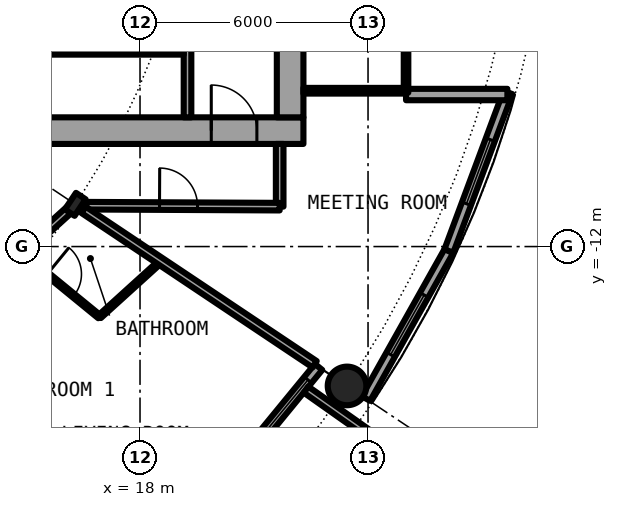
"""IFC4 building model, lengths in metres.
Left out: names, types, materials, properties, quantities, classifications, styles, units other than length and angle.
Written with IfcOpenShell. Run it as: python <this file> out.ifc"""

import sys

from ifc_helpers import new_model, si_unit, direction, frame, frame_2d, origin, origin_2d, place, context, subcontext, project, spatial, rectangle, hollow_circle, i_section, extrude, element, fill, save


model = new_model("IFC4")
c1 = context("Model", 3, precision=1e-05, world=origin(), true_north=direction((0.0, 1.0)))
c2 = subcontext(c1, "Body", "Model", "MODEL_VIEW")
j1 = project(units=[si_unit("LENGTHUNIT", "METRE"), si_unit("PLANEANGLEUNIT", "RADIAN")], contexts=[c1])
p1 = place(None, origin())
s1 = spatial("IfcSite", under=j1, at=p1, CompositionType="ELEMENT")
p2 = place(p1, origin())
s2 = spatial("IfcBuilding", under=s1, at=p2, CompositionType="ELEMENT")
p3 = place(p2, frame((0.0, 0.0, 81.9)))
s3 = spatial("IfcBuildingStorey", under=s2, at=p3, CompositionType="ELEMENT", Elevation=81.9)
p4 = place(p3, frame((23.448, -15.667, 0.0), z_axis=(0.0, 0.0, 1.0), x_axis=(1.0, 0.0, 0.0)))
e1 = element("IfcColumn", 1, at=p4, inside=s3, PredefinedType="COLUMN", context=c2, shape_type="SweptSolid", body=[
    extrude(hollow_circle(Radius=0.508, WallThickness=0.04, at=origin_2d()), origin(), (0.0, 0.0, 1.0), 3.05),
])
p5 = place(p3, frame((16.297, -10.889, 0.0), z_axis=(0.0, 0.0, 1.0), x_axis=(0.831469612303, -0.55557023302, 0.0)))
e2 = element("IfcColumn", 2, at=p5, inside=s3, PredefinedType="COLUMN", context=c2, shape_type="SweptSolid", body=[
    extrude(i_section(OverallWidth=0.306, OverallDepth=0.524, WebThickness=0.021, FlangeThickness=0.04, FilletRadius=0.027, at=origin_2d()), origin(), (0.0, 0.0, 1.0), 3.05),
])
p6 = place(p3, frame((19.304, -19.304, 0.0), z_axis=(0.0, 0.0, 1.0), x_axis=(0.634382322723, 0.773019449054, 0.0)))
e3 = element("IfcWall", 3, at=p6, inside=s3, PredefinedType="SOLIDWALL", context=c2, shape_type="SweptSolid", body=[
    extrude(rectangle(XDim=5.352, YDim=0.25, at=frame_2d((2.676, 0.0))), origin(), (0.0, 0.0, 1.0), 2.7),
])
p7 = place(p6, frame((0.841, 0.0, 0.0)))
e4 = element("IfcOpeningElement", 4, at=p7, cuts=e3, PredefinedType="OPENING", context=c2, shape_type="SweptSolid", body=[
    extrude(rectangle(XDim=1.0, YDim=2.2, at=frame_2d((0.5, 1.1))), frame((0.0, 0.135, 0.0), z_axis=(0.0, -1.0, 0.0), x_axis=(1.0, 0.0, 0.0)), (0.0, 0.0, 1.0), 0.27),
])
p8 = place(p6, frame((3.111, 0.0, 0.3)))
e5 = element("IfcOpeningElement", 5, at=p8, cuts=e3, PredefinedType="OPENING", context=c2, shape_type="SweptSolid", body=[
    extrude(rectangle(XDim=1.8, YDim=2.1, at=frame_2d((0.9, 1.05))), frame((0.0, 0.135, 0.0), z_axis=(0.0, -1.0, 0.0), x_axis=(1.0, 0.0, 0.0)), (0.0, 0.0, 1.0), 0.27),
])
p9 = place(p3, frame((22.37, -15.765, -0.03), z_axis=(0.0, 0.0, 1.0), x_axis=(0.817256123454, -0.576274612209, 0.0)))
e6 = element("IfcWall", 6, at=p9, inside=s3, PredefinedType="SOLIDWALL", context=c2, shape_type="SweptSolid", body=[
    extrude(rectangle(XDim=2.933, YDim=0.2, at=frame_2d((1.466, 0.0))), origin(), (0.0, 0.0, 1.0), 2.73),
])
p10 = place(p3, frame((23.946, -16.0, 0.0), z_axis=(0.0, 0.0, 1.0), x_axis=(0.489696356642, 0.871893042919, 0.0)))
e7 = element("IfcWall", 7, at=p10, inside=s3, PredefinedType="SOLIDWALL", context=c2, shape_type="SweptSolid", body=[
    extrude(rectangle(XDim=4.454, YDim=0.25, at=frame_2d((2.227, 0.0))), origin(), (0.0, 0.0, 1.0), 2.7),
])
p11 = place(p10, frame((1.327, 0.0, 0.3)))
e8 = element("IfcOpeningElement", 8, at=p11, cuts=e7, PredefinedType="OPENING", context=c2, shape_type="SweptSolid", body=[
    extrude(rectangle(XDim=1.8, YDim=2.1, at=frame_2d((0.9, 1.05))), frame((0.0, 0.135, 0.0), z_axis=(0.0, -1.0, 0.0), x_axis=(1.0, 0.0, 0.0)), (0.0, 0.0, 1.0), 0.27),
])
p12 = place(p3, frame((26.127, -12.117, 0.0), z_axis=(0.0, 0.0, 1.0), x_axis=(0.349247811493, 0.937030397675, 0.0)))
e9 = element("IfcWall", 9, at=p12, inside=s3, PredefinedType="SOLIDWALL", context=c2, shape_type="SweptSolid", body=[
    extrude(rectangle(XDim=4.452, YDim=0.25, at=frame_2d((2.226, 0.0))), origin(), (0.0, 0.0, 1.0), 2.7),
])
p13 = place(p12, frame((1.327, 0.0, 0.3)))
e10 = element("IfcOpeningElement", 10, at=p13, cuts=e9, PredefinedType="OPENING", context=c2, shape_type="SweptSolid", body=[
    extrude(rectangle(XDim=1.8, YDim=2.1, at=frame_2d((0.9, 1.05))), frame((0.0, 0.135, 0.0), z_axis=(0.0, -1.0, 0.0), x_axis=(1.0, 0.0, 0.0)), (0.0, 0.0, 1.0), 0.27),
])
p14 = place(p3, frame((25.0, -8.0, 0.0), z_axis=(0.0, 0.0, 1.0), x_axis=(1.0, 0.0, 0.0)))
e11 = element("IfcWall", 11, at=p14, inside=s3, PredefinedType="SOLIDWALL", context=c2, shape_type="SweptSolid", body=[
    extrude(rectangle(XDim=2.667, YDim=0.3, at=frame_2d((1.333, 0.0))), origin(), (0.0, 0.0, 1.0), 2.7),
])
p15 = place(p3, frame((8.3, -8.95, 0.0), z_axis=(0.0, 0.0, 1.0), x_axis=(1.0, 0.0, 0.0)))
e12 = element("IfcWall", 12, at=p15, inside=s3, PredefinedType="SHEAR", context=c2, shape_type="SweptSolid", body=[
    extrude(rectangle(XDim=14.0, YDim=0.7, at=frame_2d((7.0, 0.0))), origin(), (0.0, 0.0, 1.0), 3.05),
])
p16 = place(p15, frame((11.575, 0.0, 0.0)))
e13 = element("IfcOpeningElement", 13, at=p16, cuts=e12, PredefinedType="OPENING", context=c2, shape_type="SweptSolid", body=[
    extrude(rectangle(XDim=1.2, YDim=2.3, at=frame_2d((0.6, 1.15))), frame((0.0, 0.36, 0.0), z_axis=(0.0, -1.0, 0.0), x_axis=(1.0, 0.0, 0.0)), (0.0, 0.0, 1.0), 0.72),
])
p17 = place(p3, frame((21.95, 8.6, 0.0), z_axis=(0.0, 0.0, 1.0), x_axis=(0.0, -1.0, 0.0)))
e14 = element("IfcWall", 14, at=p17, inside=s3, PredefinedType="SHEAR", context=c2, shape_type="SweptSolid", body=[
    extrude(rectangle(XDim=17.2, YDim=0.7, at=frame_2d((8.6, 0.0))), origin(), (0.0, 0.0, 1.0), 3.05),
])
p18 = place(p17, frame((7.7, 0.0, 0.0)))
e15 = element("IfcOpeningElement", 15, at=p18, cuts=e14, PredefinedType="OPENING", context=c2, shape_type="SweptSolid", body=[
    extrude(rectangle(XDim=1.8, YDim=2.3, at=frame_2d((0.9, 1.15))), frame((0.0, 0.36, 0.0), z_axis=(0.0, -1.0, 0.0), x_axis=(1.0, 0.0, 0.0)), (0.0, 0.0, 1.0), 0.72),
])
p19 = place(p3, frame((19.25, -8.6, 0.0), z_axis=(0.0, 0.0, 1.0), x_axis=(0.0, 1.0, 0.0)))
e16 = element("IfcWall", 16, at=p19, inside=s3, PredefinedType="SOLIDWALL", context=c2, shape_type="SweptSolid", body=[
    extrude(rectangle(XDim=7.025, YDim=0.2, at=frame_2d((3.513, 0.0))), origin(), (0.0, 0.0, 1.0), 2.7),
])
p20 = place(p19, frame((2.35, 0.0, 0.0)))
e17 = element("IfcOpeningElement", 17, at=p20, cuts=e16, PredefinedType="OPENING", context=c2, shape_type="SweptSolid", body=[
    extrude(rectangle(XDim=1.1, YDim=2.3, at=frame_2d((0.55, 1.15))), frame((0.0, 0.11, 0.0), z_axis=(0.0, -1.0, 0.0), x_axis=(1.0, 0.0, 0.0)), (0.0, 0.0, 1.0), 0.22),
])
p21 = place(p3, frame((15.45, -6.875, 0.0), z_axis=(0.0, 0.0, 1.0), x_axis=(1.0, 0.0, 0.0)))
e18 = element("IfcWall", 18, at=p21, inside=s3, PredefinedType="PARTITIONING", context=c2, shape_type="SweptSolid", body=[
    extrude(rectangle(XDim=3.7, YDim=0.15, at=frame_2d((1.85, 0.0))), origin(), (0.0, 0.0, 1.0), 2.7),
])
p22 = place(p21, frame((1.4, 0.0, 0.0)))
e19 = element("IfcOpeningElement", 19, at=p22, cuts=e18, PredefinedType="OPENING", context=c2, shape_type="SweptSolid", body=[
    extrude(rectangle(XDim=0.9, YDim=2.3, at=frame_2d((0.45, 1.15))), frame((0.0, 0.085, 0.0), z_axis=(0.0, -1.0, 0.0), x_axis=(1.0, 0.0, 0.0)), (0.0, 0.0, 1.0), 0.17),
])
p23 = place(p3, frame((22.3, -7.9, 0.0), z_axis=(0.0, 0.0, 1.0), x_axis=(1.0, 0.0, 0.0)))
e20 = element("IfcWall", 20, at=p23, inside=s3, PredefinedType="PARTITIONING", context=c2, shape_type="SweptSolid", body=[
    extrude(rectangle(XDim=2.64, YDim=0.15, at=frame_2d((1.32, 0.0))), origin(), (0.0, 0.0, 1.0), 2.7),
])
p24 = place(p3, frame((25.0, -7.95, 0.0), z_axis=(0.0, 0.0, 1.0), x_axis=(0.0, 1.0, 0.0)))
e21 = element("IfcWall", 21, at=p24, inside=s3, PredefinedType="PARTITIONING", context=c2, shape_type="SweptSolid", body=[
    extrude(rectangle(XDim=15.9, YDim=0.12, at=frame_2d((7.95, 0.0))), origin(), (0.0, 0.0, 1.0), 2.7),
])
p25 = place(p24, frame((0.95, 0.0, 0.1)))
e22 = element("IfcOpeningElement", 22, at=p25, cuts=e21, PredefinedType="OPENING", context=c2, shape_type="SweptSolid", body=[
    extrude(rectangle(XDim=14.0, YDim=2.35, at=frame_2d((7.0, 1.175))), frame((0.0, 0.07, 0.0), z_axis=(0.0, -1.0, 0.0), x_axis=(1.0, 0.0, 0.0)), (0.0, 0.0, 1.0), 0.14),
])
p26 = place(p3, frame((21.675, -10.95, 0.0), z_axis=(0.0, 0.0, 1.0), x_axis=(0.0, 1.0, 0.0)))
e23 = element("IfcWall", 23, at=p26, inside=s3, PredefinedType="PARTITIONING", context=c2, shape_type="SweptSolid", body=[
    extrude(rectangle(XDim=1.65, YDim=0.2, at=frame_2d((0.825, 0.0))), origin(), (0.0, 0.0, 1.0), 2.7),
])
p27 = place(p3, frame((16.936, -13.845, 0.0), z_axis=(0.0, 0.0, 1.0), x_axis=(0.740836325503, 0.671685595212, 0.0)))
e24 = element("IfcWall", 24, at=p27, inside=s3, PredefinedType="PARTITIONING", context=c2, shape_type="SweptSolid", body=[
    extrude(rectangle(XDim=2.168, YDim=0.1, at=frame_2d((1.084, 0.0))), origin(), (0.0, 0.0, 1.0), 2.7),
])
p28 = place(p3, frame((9.239, -17.286, 0.0), z_axis=(0.0, 0.0, 1.0), x_axis=(0.740909940942, 0.671604392044, 0.0)))
e25 = element("IfcWall", 25, at=p28, inside=s3, PredefinedType="PARTITIONING", context=c2, shape_type="SweptSolid", body=[
    extrude(rectangle(XDim=9.367, YDim=0.2, at=frame_2d((4.683, 0.0))), origin(), (0.0, 0.0, 1.0), 2.38),
])
p29 = place(p28, frame((5.215, 0.0, 0.0)))
e26 = element("IfcOpeningElement", 26, at=p29, cuts=e25, PredefinedType="OPENING", context=c2, shape_type="SweptSolid", body=[
    extrude(rectangle(XDim=1.0, YDim=2.3, at=frame_2d((0.5, 1.15))), frame((0.0, 0.11, 0.0), z_axis=(0.0, -1.0, 0.0), x_axis=(1.0, 0.0, 0.0)), (0.0, 0.0, 1.0), 0.22),
])
p30 = place(p3, frame((16.588, -10.925, 0.0), z_axis=(0.0, 0.0, 1.0), x_axis=(0.999988019025, -0.004895079807, 0.0)))
e27 = element("IfcWall", 27, at=p30, inside=s3, PredefinedType="PARTITIONING", context=c2, shape_type="SweptSolid", body=[
    extrude(rectangle(XDim=5.087, YDim=0.2, at=frame_2d((2.543, 0.0))), origin(), (0.0, 0.0, 1.0), 2.7),
])
p31 = place(p30, frame((1.925, 0.0, 0.0)))
e28 = element("IfcOpeningElement", 28, at=p31, cuts=e27, PredefinedType="OPENING", context=c2, shape_type="SweptSolid", body=[
    extrude(rectangle(XDim=1.0, YDim=2.3, at=frame_2d((0.5, 1.15))), frame((0.0, 0.11, 0.0), z_axis=(0.0, -1.0, 0.0), x_axis=(1.0, 0.0, 0.0)), (0.0, 0.0, 1.0), 0.22),
])
p32 = place(p3, frame((12.062, -14.727, 0.0), z_axis=(0.0, 0.0, 1.0), x_axis=(0.633664062855, -0.773608334654, 0.0)))
e29 = element("IfcWall", 29, at=p32, inside=s3, PredefinedType="PARTITIONING", context=c2, shape_type="SweptSolid", body=[
    extrude(rectangle(XDim=8.138, YDim=0.1, at=frame_2d((4.069, 0.0))), origin(), (0.0, 0.0, 1.0), 2.7),
])
p33 = place(p32, frame((0.861, 0.0, 0.0)))
e30 = element("IfcOpeningElement", 30, at=p33, cuts=e29, PredefinedType="OPENING", context=c2, shape_type="SweptSolid", body=[
    extrude(rectangle(XDim=0.9, YDim=2.3, at=frame_2d((0.45, 1.15))), frame((0.0, 0.06, 0.0), z_axis=(0.0, -1.0, 0.0), x_axis=(1.0, 0.0, 0.0)), (0.0, 0.0, 1.0), 0.12),
])
p34 = place(p32, frame((4.931, 0.0, 0.0)))
e31 = element("IfcOpeningElement", 31, at=p34, cuts=e29, PredefinedType="OPENING", context=c2, shape_type="SweptSolid", body=[
    extrude(rectangle(XDim=0.9, YDim=2.3, at=frame_2d((0.45, 1.15))), frame((0.0, 0.06, 0.0), z_axis=(0.0, -1.0, 0.0), x_axis=(1.0, 0.0, 0.0)), (0.0, 0.0, 1.0), 0.12),
])
p35 = place(p3, frame((14.882, -12.171, 0.0), z_axis=(0.0, 0.0, 1.0), x_axis=(0.774162545943, -0.632986850147, 0.0)))
e32 = element("IfcWall", 32, at=p35, inside=s3, PredefinedType="PARTITIONING", context=c2, shape_type="SweptSolid", body=[
    extrude(rectangle(XDim=2.649, YDim=0.1, at=frame_2d((1.325, 0.0))), origin(), (0.0, 0.0, 1.0), 2.7),
])
p36 = place(p35, frame((0.875, 0.0, 0.0)))
e33 = element("IfcOpeningElement", 33, at=p36, cuts=e32, PredefinedType="OPENING", context=c2, shape_type="SweptSolid", body=[
    extrude(rectangle(XDim=0.9, YDim=2.3, at=frame_2d((0.45, 1.15))), frame((0.0, 0.06, 0.0), z_axis=(0.0, -1.0, 0.0), x_axis=(1.0, 0.0, 0.0)), (0.0, 0.0, 1.0), 0.12),
])
p37 = place(p3, frame((16.515, -11.035, 0.0), z_axis=(0.0, 0.0, 1.0), x_axis=(0.831505405283, -0.555516661303, 0.0)))
e34 = element("IfcWall", 34, at=p37, inside=s3, PredefinedType="PARTITIONING", context=c2, shape_type="SweptSolid", body=[
    extrude(rectangle(XDim=7.312, YDim=0.2, at=frame_2d((3.656, 0.0))), origin(), (0.0, 0.0, 1.0), 2.7),
])
p38 = place(p8, origin())
e35 = element("IfcWindow", 35, at=p38, inside=s3, PartitioningType="SINGLE_PANEL", PredefinedType="WINDOW", context=c2, shape_type="SweptSolid", body=[
    extrude(rectangle(XDim=1.8, YDim=2.1, at=frame_2d((0.9, 1.05))), frame((0.0, 0.03, 0.0), z_axis=(0.0, -1.0, 0.0), x_axis=(1.0, 0.0, 0.0)), (0.0, 0.0, 1.0), 0.06),
])
fill(e5, e35)
p39 = place(p11, origin())
e36 = element("IfcWindow", 36, at=p39, inside=s3, PartitioningType="SINGLE_PANEL", PredefinedType="WINDOW", context=c2, shape_type="SweptSolid", body=[
    extrude(rectangle(XDim=1.8, YDim=2.1, at=frame_2d((0.9, 1.05))), frame((0.0, 0.03, 0.0), z_axis=(0.0, -1.0, 0.0), x_axis=(1.0, 0.0, 0.0)), (0.0, 0.0, 1.0), 0.06),
])
fill(e8, e36)
p40 = place(p13, origin())
e37 = element("IfcWindow", 37, at=p40, inside=s3, PartitioningType="SINGLE_PANEL", PredefinedType="WINDOW", context=c2, shape_type="SweptSolid", body=[
    extrude(rectangle(XDim=1.8, YDim=2.1, at=frame_2d((0.9, 1.05))), frame((0.0, 0.03, 0.0), z_axis=(0.0, -1.0, 0.0), x_axis=(1.0, 0.0, 0.0)), (0.0, 0.0, 1.0), 0.06),
])
fill(e10, e37)
p41 = place(p22, origin())
e38 = element("IfcDoor", 38, at=p41, inside=s3, OperationType="SINGLE_SWING_LEFT", PredefinedType="DOOR", context=c2, shape_type="SweptSolid", body=[
    extrude(rectangle(XDim=0.9, YDim=2.3, at=frame_2d((0.45, 1.15))), frame((0.0, 0.025, 0.0), z_axis=(0.0, -1.0, 0.0), x_axis=(1.0, 0.0, 0.0)), (0.0, 0.0, 1.0), 0.05),
])
fill(e19, e38)
p42 = place(p16, origin())
e39 = element("IfcDoor", 39, at=p42, inside=s3, OperationType="SINGLE_SWING_LEFT", PredefinedType="DOOR", context=c2, shape_type="SweptSolid", body=[
    extrude(rectangle(XDim=1.2, YDim=2.3, at=frame_2d((0.6, 1.15))), frame((0.0, 0.025, 0.0), z_axis=(0.0, -1.0, 0.0), x_axis=(1.0, 0.0, 0.0)), (0.0, 0.0, 1.0), 0.05),
])
fill(e13, e39)
p43 = place(p25, origin())
e40 = element("IfcWindow", 40, at=p43, inside=s3, PartitioningType="SINGLE_PANEL", PredefinedType="WINDOW", context=c2, shape_type="SweptSolid", body=[
    extrude(rectangle(XDim=14.0, YDim=2.35, at=frame_2d((7.0, 1.175))), frame((0.0, 0.03, 0.0), z_axis=(0.0, -1.0, 0.0), x_axis=(1.0, 0.0, 0.0)), (0.0, 0.0, 1.0), 0.06),
])
fill(e22, e40)
p44 = place(p36, origin())
e41 = element("IfcDoor", 41, at=p44, inside=s3, OperationType="SINGLE_SWING_RIGHT", PredefinedType="DOOR", context=c2, shape_type="SweptSolid", body=[
    extrude(rectangle(XDim=0.9, YDim=2.3, at=frame_2d((0.45, 1.15))), frame((0.0, 0.025, 0.0), z_axis=(0.0, -1.0, 0.0), x_axis=(1.0, 0.0, 0.0)), (0.0, 0.0, 1.0), 0.05),
])
fill(e33, e41)
p45 = place(p31, origin())
e42 = element("IfcDoor", 42, at=p45, inside=s3, OperationType="SINGLE_SWING_LEFT", PredefinedType="DOOR", context=c2, shape_type="SweptSolid", body=[
    extrude(rectangle(XDim=1.0, YDim=2.3, at=frame_2d((0.5, 1.15))), frame((0.0, 0.025, 0.0), z_axis=(0.0, -1.0, 0.0), x_axis=(1.0, 0.0, 0.0)), (0.0, 0.0, 1.0), 0.05),
])
fill(e28, e42)
save(model, sys.argv[1])
